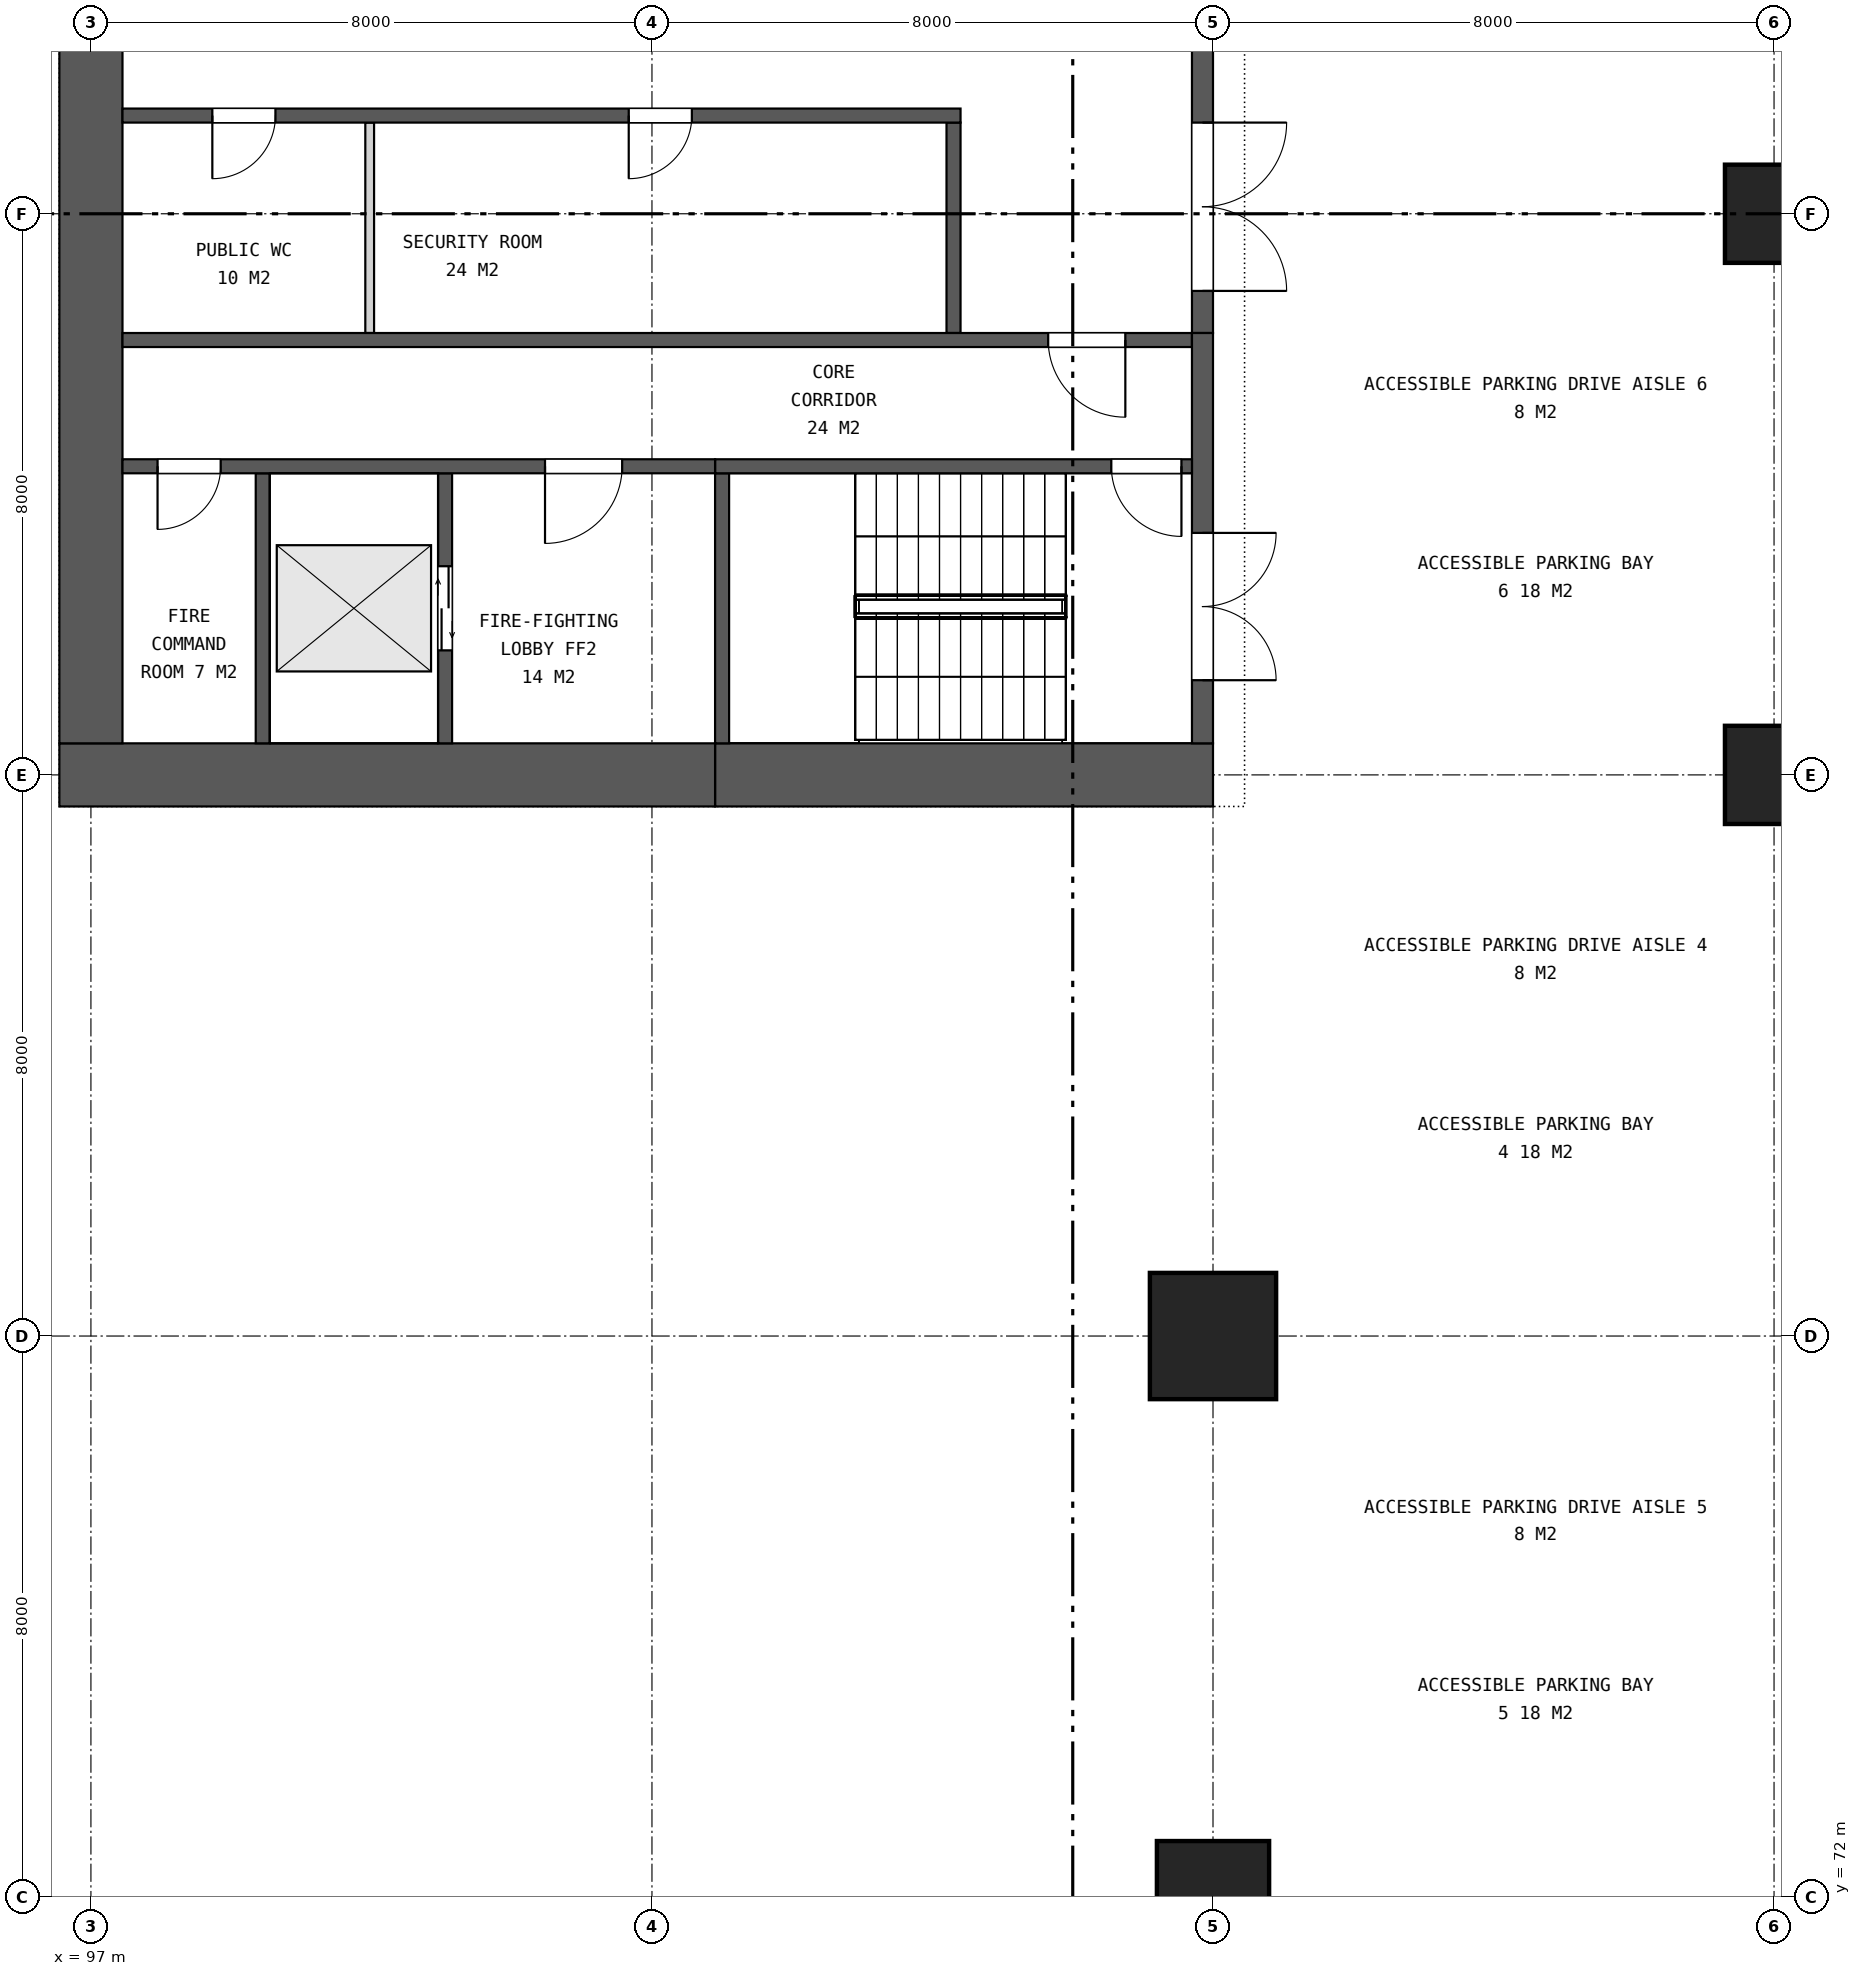
"""IFC4 building model, lengths in metres.
Left out: names, types, materials, properties, quantities, classifications, styles, units other than length and angle.
Written with IfcOpenShell. Run it as: python <this file> out.ifc"""

import sys

from ifc_helpers import new_model, si_unit, direction, frame, frame_2d, origin, origin_2d, place, context, subcontext, project, spatial, rectangle, circle, extrude, element, fill, save


model = new_model("IFC4")
c1 = context("Model", 3, precision=1e-05, world=origin(), true_north=direction((0.0, 1.0)))
c2 = subcontext(c1, "Body", "Model", "MODEL_VIEW")
j1 = project(units=[si_unit("LENGTHUNIT", "METRE"), si_unit("PLANEANGLEUNIT", "RADIAN")], contexts=[c1])
p1 = place(None, origin())
s1 = spatial("IfcSite", under=j1, at=p1, CompositionType="ELEMENT")
p2 = place(p1, origin())
s2 = spatial("IfcBuilding", under=s1, at=p2, CompositionType="ELEMENT")
p3 = place(p2, origin())
s3 = spatial("IfcBuildingStorey", under=s2, at=p3, CompositionType="ELEMENT", Elevation=0.0)
p4 = place(p3, frame((113.0, 72.0, -0.4), z_axis=(0.0, 0.0, 1.0), x_axis=(1.0, 0.0, 0.0)))
e1 = element("IfcColumn", 1, at=p4, inside=s3, PredefinedType="COLUMN", context=c2, shape_type="SweptSolid", body=[
    extrude(circle(Radius=0.8, at=origin_2d()), origin(), (0.0, 0.0, 1.0), 10.4),
])
p5 = place(p3, frame((113.0, 80.0, -0.4), z_axis=(0.0, 0.0, 1.0), x_axis=(1.0, 0.0, 0.0)))
e2 = element("IfcColumn", 2, at=p5, inside=s3, PredefinedType="COLUMN", context=c2, shape_type="SweptSolid", body=[
    extrude(circle(Radius=0.9, at=origin_2d()), origin(), (0.0, 0.0, 1.0), 10.4),
])
for number, where, z_axis, x_axis in (
    (3, (121.0, 88.0, -0.4), (0.0, 0.0, 1.0), (1.0, 0.0, 0.0)),
    (4, (121.0, 96.0, -0.4), (0.0, 0.0, 1.0), (1.0, 0.0, 0.0)),
):
    element("IfcColumn", number, at=place(p3, frame(where, z_axis=z_axis, x_axis=x_axis)), inside=s3, PredefinedType="COLUMN", context=c2, shape_type="SweptSolid", body=[
        extrude(circle(Radius=0.7, at=origin_2d()), origin(), (0.0, 0.0, 1.0), 10.4),
    ])
p6 = place(p3, frame((113.0, 88.0, 0.0), z_axis=(0.0, 0.0, 1.0), x_axis=(-1.0, 0.0, 0.0)))
e5 = element("IfcWall", 5, at=p6, inside=s3, PredefinedType="SHEAR", context=c2, shape_type="SweptSolid", body=[
    extrude(rectangle(XDim=7.1, YDim=0.9, at=frame_2d((3.55, 0.0))), origin(), (0.0, 0.0, 1.0), 10.0),
])
p7 = place(p3, frame((105.9, 88.0, 0.0), z_axis=(0.0, 0.0, 1.0), x_axis=(-1.0, 0.0, 0.0)))
e6 = element("IfcWall", 6, at=p7, inside=s3, PredefinedType="SHEAR", context=c2, shape_type="SweptSolid", body=[
    extrude(rectangle(XDim=9.35, YDim=0.9, at=frame_2d((4.675, 0.0))), origin(), (0.0, 0.0, 1.0), 10.0),
])
p8 = place(p3, frame((97.0, 111.55, 0.0), z_axis=(0.0, 0.0, 1.0), x_axis=(0.0, -1.0, 0.0)))
e7 = element("IfcWall", 7, at=p8, inside=s3, PredefinedType="SHEAR", context=c2, shape_type="SweptSolid", body=[
    extrude(rectangle(XDim=23.1, YDim=0.9, at=frame_2d((11.55, 0.0))), origin(), (0.0, 0.0, 1.0), 10.0),
])
p9 = place(p8, frame((10.35, 0.0, 0.0)))
e8 = element("IfcOpeningElement", 8, at=p9, cuts=e7, PredefinedType="OPENING", context=c2, shape_type="SweptSolid", body=[
    extrude(rectangle(XDim=2.4, YDim=2.4, at=frame_2d((1.2, 1.2))), frame((0.0, 0.46, 0.0), z_axis=(0.0, -1.0, 0.0), x_axis=(1.0, 0.0, 0.0)), (0.0, 0.0, 1.0), 0.92),
])
p10 = place(p3, frame((112.85, 105.7, 0.0), z_axis=(0.0, 0.0, 1.0), x_axis=(0.0, -1.0, 0.0)))
e9 = element("IfcWall", 9, at=p10, inside=s3, PredefinedType="SHEAR", context=c2, shape_type="SweptSolid", body=[
    extrude(rectangle(XDim=11.4, YDim=0.3, at=frame_2d((5.7, 0.0))), origin(), (0.0, 0.0, 1.0), 10.0),
])
p11 = place(p10, frame((0.6, 0.0, 0.0)))
e10 = element("IfcOpeningElement", 10, at=p11, cuts=e9, PredefinedType="OPENING", context=c2, shape_type="SweptSolid", body=[
    extrude(rectangle(XDim=2.4, YDim=2.4, at=frame_2d((1.2, 1.2))), frame((0.0, 0.16, 0.0), z_axis=(0.0, -1.0, 0.0), x_axis=(1.0, 0.0, 0.0)), (0.0, 0.0, 1.0), 0.32),
])
p12 = place(p10, frame((4.5, 0.0, 0.0)))
e11 = element("IfcOpeningElement", 11, at=p12, cuts=e9, PredefinedType="OPENING", context=c2, shape_type="SweptSolid", body=[
    extrude(rectangle(XDim=2.4, YDim=2.4, at=frame_2d((1.2, 1.2))), frame((0.0, 0.16, 0.0), z_axis=(0.0, -1.0, 0.0), x_axis=(1.0, 0.0, 0.0)), (0.0, 0.0, 1.0), 0.32),
])
p13 = place(p10, frame((8.4, 0.0, 0.0)))
e12 = element("IfcOpeningElement", 12, at=p13, cuts=e9, PredefinedType="OPENING", context=c2, shape_type="SweptSolid", body=[
    extrude(rectangle(XDim=2.4, YDim=2.4, at=frame_2d((1.2, 1.2))), frame((0.0, 0.16, 0.0), z_axis=(0.0, -1.0, 0.0), x_axis=(1.0, 0.0, 0.0)), (0.0, 0.0, 1.0), 0.32),
])
p14 = place(p3, frame((109.3, 97.3, 0.0), z_axis=(0.0, 0.0, 1.0), x_axis=(0.0, -1.0, 0.0)))
e13 = element("IfcWall", 13, at=p14, inside=s3, PredefinedType="SHEAR", context=c2, shape_type="SweptSolid", body=[
    extrude(rectangle(XDim=3.0, YDim=0.2, at=frame_2d((1.5, 0.0))), origin(), (0.0, 0.0, 1.0), 10.0),
])
p15 = place(p3, frame((100.975, 97.3, 0.0), z_axis=(0.0, 0.0, 1.0), x_axis=(0.0, -1.0, 0.0)))
e14 = element("IfcWall", 14, at=p15, inside=s3, PredefinedType="PARTITIONING", context=c2, shape_type="SweptSolid", body=[
    extrude(rectangle(XDim=3.0, YDim=0.125, at=frame_2d((1.5, 0.0))), origin(), (0.0, 0.0, 1.0), 10.0),
])
p16 = place(p3, frame((109.4, 97.4, 0.0), z_axis=(0.0, 0.0, 1.0), x_axis=(-1.0, 0.0, 0.0)))
e15 = element("IfcWall", 15, at=p16, inside=s3, PredefinedType="SHEAR", context=c2, shape_type="SweptSolid", body=[
    extrude(rectangle(XDim=11.95, YDim=0.2, at=frame_2d((5.975, 0.0))), origin(), (0.0, 0.0, 1.0), 10.0),
])
p17 = place(p16, frame((3.831, 0.0, 0.0)))
e16 = element("IfcOpeningElement", 16, at=p17, cuts=e15, PredefinedType="OPENING", context=c2, shape_type="SweptSolid", body=[
    extrude(rectangle(XDim=0.9, YDim=2.1, at=frame_2d((0.45, 1.05))), frame((0.0, 0.11, 0.0), z_axis=(0.0, -1.0, 0.0), x_axis=(1.0, 0.0, 0.0)), (0.0, 0.0, 1.0), 0.22),
])
p18 = place(p16, frame((9.769, 0.0, 0.0)))
e17 = element("IfcOpeningElement", 17, at=p18, cuts=e15, PredefinedType="OPENING", context=c2, shape_type="SweptSolid", body=[
    extrude(rectangle(XDim=0.9, YDim=2.1, at=frame_2d((0.45, 1.05))), frame((0.0, 0.11, 0.0), z_axis=(0.0, -1.0, 0.0), x_axis=(1.0, 0.0, 0.0)), (0.0, 0.0, 1.0), 0.22),
])
p19 = place(p3, frame((112.7, 94.2, 0.0), z_axis=(0.0, 0.0, 1.0), x_axis=(-1.0, 0.0, 0.0)))
e18 = element("IfcWall", 18, at=p19, inside=s3, PredefinedType="SHEAR", context=c2, shape_type="SweptSolid", body=[
    extrude(rectangle(XDim=15.25, YDim=0.2, at=frame_2d((7.625, 0.0))), origin(), (0.0, 0.0, 1.0), 10.0),
])
p20 = place(p19, frame((0.95, 0.0, 0.0)))
e19 = element("IfcOpeningElement", 19, at=p20, cuts=e18, PredefinedType="OPENING", context=c2, shape_type="SweptSolid", body=[
    extrude(rectangle(XDim=1.1, YDim=2.1, at=frame_2d((0.55, 1.05))), frame((0.0, 0.11, 0.0), z_axis=(0.0, -1.0, 0.0), x_axis=(1.0, 0.0, 0.0)), (0.0, 0.0, 1.0), 0.22),
])
p21 = place(p3, frame((112.85, 94.3, 0.0), z_axis=(0.0, 0.0, 1.0), x_axis=(0.0, -1.0, 0.0)))
e20 = element("IfcWall", 20, at=p21, inside=s3, PredefinedType="SHEAR", context=c2, shape_type="SweptSolid", body=[
    extrude(rectangle(XDim=5.85, YDim=0.3, at=frame_2d((2.925, 0.0))), origin(), (0.0, 0.0, 1.0), 10.0),
])
p22 = place(p21, frame((2.85, 0.0, 0.0)))
e21 = element("IfcOpeningElement", 21, at=p22, cuts=e20, PredefinedType="OPENING", context=c2, shape_type="SweptSolid", body=[
    extrude(rectangle(XDim=2.1, YDim=2.4, at=frame_2d((1.05, 1.2))), frame((0.0, 0.16, 0.0), z_axis=(0.0, -1.0, 0.0), x_axis=(1.0, 0.0, 0.0)), (0.0, 0.0, 1.0), 0.32),
])
p23 = place(p3, frame((106.0, 92.3, 0.0), z_axis=(0.0, 0.0, 1.0), x_axis=(0.0, -1.0, 0.0)))
e22 = element("IfcWall", 22, at=p23, inside=s3, PredefinedType="SHEAR", context=c2, shape_type="SweptSolid", body=[
    extrude(rectangle(XDim=3.85, YDim=0.2, at=frame_2d((1.925, 0.0))), origin(), (0.0, 0.0, 1.0), 10.0),
])
p24 = place(p3, frame((102.05, 92.3, 0.0), z_axis=(0.0, 0.0, 1.0), x_axis=(0.0, -1.0, 0.0)))
e23 = element("IfcWall", 23, at=p24, inside=s3, PredefinedType="SHEAR", context=c2, shape_type="SweptSolid", body=[
    extrude(rectangle(XDim=3.85, YDim=0.2, at=frame_2d((1.925, 0.0))), origin(), (0.0, 0.0, 1.0), 10.0),
])
p25 = place(p24, frame((1.325, 0.0, 0.0)))
e24 = element("IfcOpeningElement", 24, at=p25, cuts=e23, PredefinedType="OPENING", context=c2, shape_type="SweptSolid", body=[
    extrude(rectangle(XDim=1.2, YDim=2.1, at=frame_2d((0.6, 1.05))), frame((0.0, 0.11, 0.0), z_axis=(0.0, -1.0, 0.0), x_axis=(1.0, 0.0, 0.0)), (0.0, 0.0, 1.0), 0.22),
])
p26 = place(p3, frame((99.45, 92.3, 0.0), z_axis=(0.0, 0.0, 1.0), x_axis=(0.0, -1.0, 0.0)))
e25 = element("IfcWall", 25, at=p26, inside=s3, PredefinedType="SHEAR", context=c2, shape_type="SweptSolid", body=[
    extrude(rectangle(XDim=3.85, YDim=0.2, at=frame_2d((1.925, 0.0))), origin(), (0.0, 0.0, 1.0), 10.0),
])
p27 = place(p3, frame((112.7, 92.4, 0.0), z_axis=(0.0, 0.0, 1.0), x_axis=(-1.0, 0.0, 0.0)))
e26 = element("IfcWall", 26, at=p27, inside=s3, PredefinedType="SHEAR", context=c2, shape_type="SweptSolid", body=[
    extrude(rectangle(XDim=6.8, YDim=0.2, at=frame_2d((3.4, 0.0))), origin(), (0.0, 0.0, 1.0), 10.0),
])
p28 = place(p27, frame((0.15, 0.0, 0.0)))
e27 = element("IfcOpeningElement", 27, at=p28, cuts=e26, PredefinedType="OPENING", context=c2, shape_type="SweptSolid", body=[
    extrude(rectangle(XDim=1.0, YDim=2.1, at=frame_2d((0.5, 1.05))), frame((0.0, 0.11, 0.0), z_axis=(0.0, -1.0, 0.0), x_axis=(1.0, 0.0, 0.0)), (0.0, 0.0, 1.0), 0.22),
])
p29 = place(p3, frame((105.9, 92.4, 0.0), z_axis=(0.0, 0.0, 1.0), x_axis=(-1.0, 0.0, 0.0)))
e28 = element("IfcWall", 28, at=p29, inside=s3, PredefinedType="SHEAR", context=c2, shape_type="SweptSolid", body=[
    extrude(rectangle(XDim=8.45, YDim=0.2, at=frame_2d((4.225, 0.0))), origin(), (0.0, 0.0, 1.0), 10.0),
])
p30 = place(p29, frame((1.325, 0.0, 0.0)))
e29 = element("IfcOpeningElement", 29, at=p30, cuts=e28, PredefinedType="OPENING", context=c2, shape_type="SweptSolid", body=[
    extrude(rectangle(XDim=1.1, YDim=2.1, at=frame_2d((0.55, 1.05))), frame((0.0, 0.11, 0.0), z_axis=(0.0, -1.0, 0.0), x_axis=(1.0, 0.0, 0.0)), (0.0, 0.0, 1.0), 0.22),
])
p31 = place(p29, frame((7.05, 0.0, 0.0)))
e30 = element("IfcOpeningElement", 30, at=p31, cuts=e28, PredefinedType="OPENING", context=c2, shape_type="SweptSolid", body=[
    extrude(rectangle(XDim=0.9, YDim=2.1, at=frame_2d((0.45, 1.05))), frame((0.0, 0.11, 0.0), z_axis=(0.0, -1.0, 0.0), x_axis=(1.0, 0.0, 0.0)), (0.0, 0.0, 1.0), 0.22),
])
p32 = place(p13, origin())
e31 = element("IfcDoor", 31, at=p32, inside=s3, OperationType="DOUBLE_DOOR_SINGLE_SWING", PredefinedType="DOOR", context=c2, shape_type="SweptSolid", body=[
    extrude(rectangle(XDim=2.4, YDim=2.4, at=frame_2d((1.2, 1.2))), frame((0.0, 0.025, 0.0), z_axis=(0.0, -1.0, 0.0), x_axis=(1.0, 0.0, 0.0)), (0.0, 0.0, 1.0), 0.05),
])
fill(e12, e31)
p33 = place(p17, origin())
e32 = element("IfcDoor", 32, at=p33, inside=s3, OperationType="SINGLE_SWING_RIGHT", PredefinedType="DOOR", context=c2, shape_type="SweptSolid", body=[
    extrude(rectangle(XDim=0.9, YDim=2.1, at=frame_2d((0.45, 1.05))), frame((0.0, 0.025, 0.0), z_axis=(0.0, -1.0, 0.0), x_axis=(1.0, 0.0, 0.0)), (0.0, 0.0, 1.0), 0.05),
])
fill(e16, e32)
p34 = place(p18, origin())
e33 = element("IfcDoor", 33, at=p34, inside=s3, OperationType="SINGLE_SWING_RIGHT", PredefinedType="DOOR", context=c2, shape_type="SweptSolid", body=[
    extrude(rectangle(XDim=0.9, YDim=2.1, at=frame_2d((0.45, 1.05))), frame((0.0, 0.025, 0.0), z_axis=(0.0, -1.0, 0.0), x_axis=(1.0, 0.0, 0.0)), (0.0, 0.0, 1.0), 0.05),
])
fill(e17, e33)
p35 = place(p20, origin())
e34 = element("IfcDoor", 34, at=p35, inside=s3, OperationType="SINGLE_SWING_LEFT", PredefinedType="DOOR", context=c2, shape_type="SweptSolid", body=[
    extrude(rectangle(XDim=1.1, YDim=2.1, at=frame_2d((0.55, 1.05))), frame((0.0, 0.025, 0.0), z_axis=(0.0, -1.0, 0.0), x_axis=(1.0, 0.0, 0.0)), (0.0, 0.0, 1.0), 0.05),
])
fill(e19, e34)
p36 = place(p22, origin())
e35 = element("IfcDoor", 35, at=p36, inside=s3, OperationType="DOUBLE_DOOR_SINGLE_SWING", PredefinedType="DOOR", context=c2, shape_type="SweptSolid", body=[
    extrude(rectangle(XDim=2.1, YDim=2.4, at=frame_2d((1.05, 1.2))), frame((0.0, 0.025, 0.0), z_axis=(0.0, -1.0, 0.0), x_axis=(1.0, 0.0, 0.0)), (0.0, 0.0, 1.0), 0.05),
])
fill(e21, e35)
p37 = place(p25, origin())
e36 = element("IfcDoor", 36, at=p37, inside=s3, OperationType="DOUBLE_DOOR_SLIDING", PredefinedType="DOOR", context=c2, shape_type="SweptSolid", body=[
    extrude(rectangle(XDim=1.2, YDim=2.1, at=frame_2d((0.6, 1.05))), frame((0.0, 0.025, 0.0), z_axis=(0.0, -1.0, 0.0), x_axis=(1.0, 0.0, 0.0)), (0.0, 0.0, 1.0), 0.05),
])
fill(e24, e36)
p38 = place(p28, origin())
e37 = element("IfcDoor", 37, at=p38, inside=s3, OperationType="SINGLE_SWING_LEFT", PredefinedType="DOOR", context=c2, shape_type="SweptSolid", body=[
    extrude(rectangle(XDim=1.0, YDim=2.1, at=frame_2d((0.5, 1.05))), frame((0.0, 0.025, 0.0), z_axis=(0.0, -1.0, 0.0), x_axis=(1.0, 0.0, 0.0)), (0.0, 0.0, 1.0), 0.05),
])
fill(e27, e37)
p39 = place(p30, origin())
e38 = element("IfcDoor", 38, at=p39, inside=s3, OperationType="SINGLE_SWING_RIGHT", PredefinedType="DOOR", context=c2, shape_type="SweptSolid", body=[
    extrude(rectangle(XDim=1.1, YDim=2.1, at=frame_2d((0.55, 1.05))), frame((0.0, 0.025, 0.0), z_axis=(0.0, -1.0, 0.0), x_axis=(1.0, 0.0, 0.0)), (0.0, 0.0, 1.0), 0.05),
])
fill(e29, e38)
p40 = place(p31, origin())
e39 = element("IfcDoor", 39, at=p40, inside=s3, OperationType="SINGLE_SWING_RIGHT", PredefinedType="DOOR", context=c2, shape_type="SweptSolid", body=[
    extrude(rectangle(XDim=0.9, YDim=2.1, at=frame_2d((0.45, 1.05))), frame((0.0, 0.025, 0.0), z_axis=(0.0, -1.0, 0.0), x_axis=(1.0, 0.0, 0.0)), (0.0, 0.0, 1.0), 0.05),
])
fill(e30, e39)
save(model, sys.argv[1])
